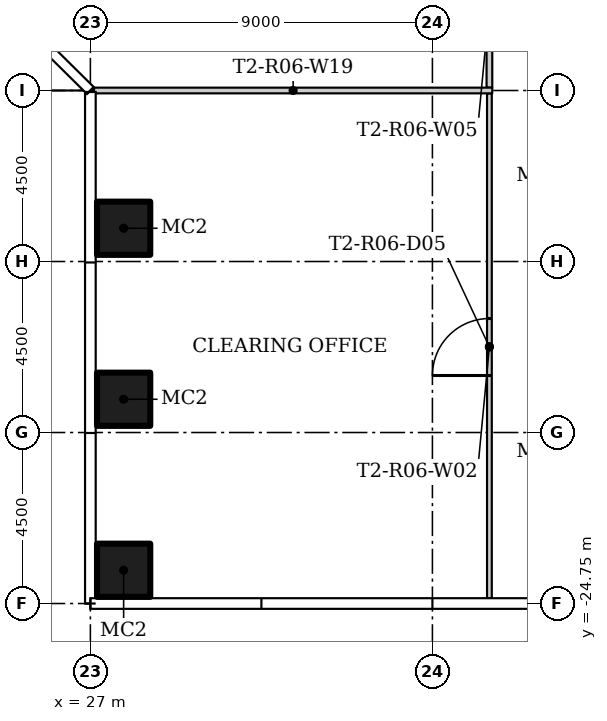
"""IFC4 building model, lengths in metres.
Left out: names, types, materials, properties, quantities, classifications, styles, units other than length and angle.
Written with IfcOpenShell. Run it as: python <this file> out.ifc"""

import sys

from ifc_helpers import new_model, si_unit, direction, frame, frame_2d, origin, origin_2d, place, context, subcontext, project, spatial, rectangle, hollow_rectangle, extrude, element, fill, save


model = new_model("IFC4")
c1 = context("Model", 3, precision=1e-05, world=origin(), true_north=direction((0.0, 1.0)))
c2 = subcontext(c1, "Body", "Model", "MODEL_VIEW")
j1 = project(units=[si_unit("LENGTHUNIT", "METRE"), si_unit("PLANEANGLEUNIT", "RADIAN")], contexts=[c1])
p1 = place(None, origin())
s1 = spatial("IfcSite", under=j1, at=p1, CompositionType="ELEMENT")
p2 = place(p1, origin())
s2 = spatial("IfcBuilding", under=s1, at=p2, CompositionType="ELEMENT")
p3 = place(p2, frame((0.0, 0.0, 61.5)))
s3 = spatial("IfcBuildingStorey", under=s2, at=p3, CompositionType="ELEMENT", Elevation=61.5)
for number, where in (
    (1, (27.875, -14.875, 0.0)),
    (2, (27.875, -19.375, 0.0)),
    (3, (27.875, -23.875, 0.0)),
):
    element("IfcColumn", number, at=place(p3, frame(where)), inside=s3, PredefinedType="COLUMN", context=c2, shape_type="SweptSolid", body=[
        extrude(hollow_rectangle(XDim=1.4, YDim=1.4, WallThickness=0.05, at=origin_2d()), origin(), (0.0, 0.0, 1.0), 3.55),
    ])
p4 = place(p3, frame((37.5, -24.655, 0.0), z_axis=(0.0, 0.0, 1.0), x_axis=(0.0, 1.0, 0.0)))
e4 = element("IfcWall", 4, at=p4, inside=s3, PredefinedType="PARTITIONING", context=c2, shape_type="SweptSolid", body=[
    extrude(rectangle(XDim=13.33, YDim=0.125, at=frame_2d((6.665, 0.0))), origin(), (0.0, 0.0, 1.0), 3.55),
])
p5 = place(p4, frame((5.905, 0.0, 0.0)))
e5 = element("IfcOpeningElement", 5, at=p5, cuts=e4, PredefinedType="OPENING", context=c2, shape_type="SweptSolid", body=[
    extrude(rectangle(XDim=1.5, YDim=2.1, at=frame_2d((0.75, 1.05))), frame((0.0, 0.073, 0.0), z_axis=(0.0, -1.0, 0.0), x_axis=(1.0, 0.0, 0.0)), (0.0, 0.0, 1.0), 0.145),
])
p6 = place(p3, frame((37.5, -11.175, 0.0), z_axis=(0.0, 0.0, 1.0), x_axis=(0.0, 1.0, 0.0)))
e6 = element("IfcWall", 6, at=p6, inside=s3, PredefinedType="PARTITIONING", context=c2, shape_type="SweptSolid", body=[
    extrude(rectangle(XDim=4.325, YDim=0.15, at=frame_2d((2.163, 0.0))), origin(), (0.0, 0.0, 1.0), 3.55),
])
p7 = place(p6, frame((1.725, 0.0, 0.0)))
e7 = element("IfcOpeningElement", 7, at=p7, cuts=e6, PredefinedType="OPENING", context=c2, shape_type="SweptSolid", body=[
    extrude(rectangle(XDim=0.9, YDim=2.1, at=frame_2d((0.45, 1.05))), frame((0.0, 0.085, 0.0), z_axis=(0.0, -1.0, 0.0), x_axis=(1.0, 0.0, 0.0)), (0.0, 0.0, 1.0), 0.17),
])
p8 = place(p3, frame((27.095, -11.25, 0.0)))
e8 = element("IfcWall", 8, at=p8, inside=s3, PredefinedType="PARTITIONING", context=c2, shape_type="SweptSolid", body=[
    extrude(rectangle(XDim=10.48, YDim=0.15, at=frame_2d((5.24, 0.0))), origin(), (0.0, 0.0, 1.0), 3.55),
])
p9 = place(p5, origin())
e9 = element("IfcDoor", 9, at=p9, inside=s3, OperationType="DOUBLE_DOOR_SINGLE_SWING", PredefinedType="DOOR", context=c2, shape_type="SweptSolid", body=[
    extrude(rectangle(XDim=1.5, YDim=2.1, at=frame_2d((0.75, 1.05))), frame((0.0, 0.025, 0.0), z_axis=(0.0, -1.0, 0.0), x_axis=(1.0, 0.0, 0.0)), (0.0, 0.0, 1.0), 0.05),
])
fill(e5, e9)
save(model, sys.argv[1])
